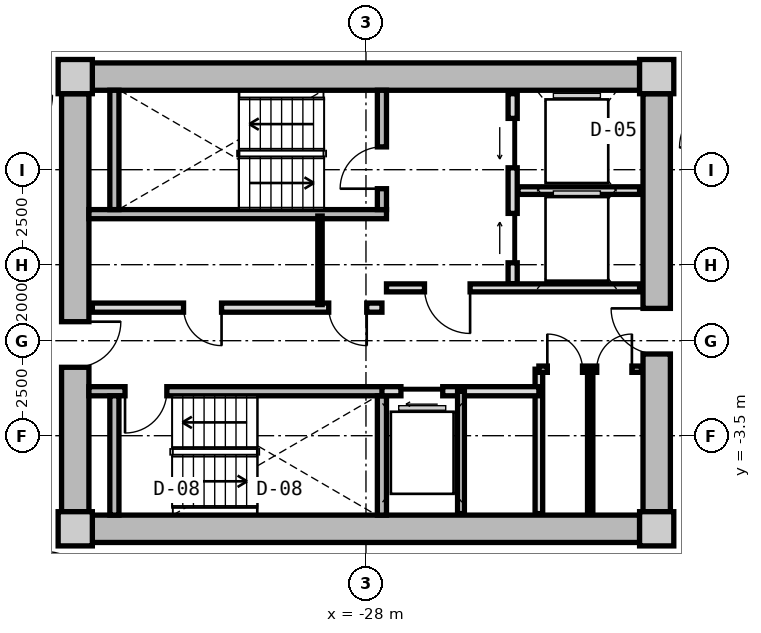
"""IFC4 building model, lengths in metres.
Left out: names, types, materials, properties, quantities, classifications, styles, units other than length and angle.
Written with IfcOpenShell. Run it as: python <this file> out.ifc"""

import sys

from ifc_helpers import new_model, si_unit, direction, frame, frame_2d, origin, origin_2d, place, context, subcontext, project, spatial, rectangle, extrude, source, transform, mapped, element, fill, save


model = new_model("IFC4")
c1 = context("Model", 3, precision=1e-05, world=origin(), true_north=direction((0.0, 1.0)))
c2 = subcontext(c1, "Body", "Model", "MODEL_VIEW")
j1 = project(units=[si_unit("LENGTHUNIT", "METRE"), si_unit("PLANEANGLEUNIT", "RADIAN")], contexts=[c1])
p1 = place(None, origin())
s1 = spatial("IfcSite", under=j1, at=p1, CompositionType="ELEMENT")
p2 = place(p1, origin())
s2 = spatial("IfcBuilding", under=s1, at=p2, CompositionType="ELEMENT")
p3 = place(p2, frame((0.0, 0.0, 108.45)))
s3 = spatial("IfcBuildingStorey", under=s2, at=p3, CompositionType="ELEMENT", Elevation=108.45)
m1 = source(origin(), c2, "Body", "SweptSolid", [
    extrude(rectangle(XDim=0.9, YDim=0.9, at=origin_2d()), origin(), (0.0, 0.0, 1.0), 3.05),
])
for number, where, z_axis, x_axis in (
    (1, (-35.65, -5.95, 0.0), (0.0, 0.0, 1.0), (1.0, 0.0, 0.0)),
    (2, (-20.35, -5.95, 0.0), (0.0, 0.0, 1.0), (1.0, 0.0, 0.0)),
    (3, (-20.35, 5.95, 0.0), (0.0, 0.0, 1.0), (1.0, 0.0, 0.0)),
    (4, (-35.65, 5.95, 0.0), (0.0, 0.0, 1.0), (1.0, 0.0, 0.0)),
):
    element("IfcColumn", number, at=place(p3, frame(where, z_axis=z_axis, x_axis=x_axis)), inside=s3, PredefinedType="COLUMN", context=c2, shape_type="MappedRepresentation", body=[
        mapped(m1, transform((0.0, 0.0, 0.0), x_axis=(1.0, 0.0, 0.0), y_axis=(0.0, 1.0, 0.0), z_axis=(0.0, 0.0, 1.0), scale=1.0)),
    ])
m2 = source(origin(), c2, "Body", "SweptSolid", [
    extrude(rectangle(XDim=14.4, YDim=0.72, at=frame_2d((7.2, 0.0))), origin(), (0.0, 0.0, 1.0), 2.79),
])
for number, where, z_axis, x_axis in (
    (5, (-35.2, 5.95, 0.0), (0.0, 0.0, 1.0), (1.0, 0.0, 0.0)),
    (6, (-20.8, -5.95, 0.0), (0.0, 0.0, 1.0), (-1.0, 0.0, 0.0)),
):
    element("IfcWall", number, at=place(p3, frame(where, z_axis=z_axis, x_axis=x_axis)), inside=s3, PredefinedType="SHEAR", context=c2, shape_type="MappedRepresentation", body=[
        mapped(m2, transform((0.0, 0.0, 0.0), x_axis=(1.0, 0.0, 0.0), y_axis=(0.0, 1.0, 0.0), z_axis=(0.0, 0.0, 1.0), scale=1.0)),
    ])
m3 = source(origin(), c2, "Body", "SweptSolid", [
    extrude(rectangle(XDim=11.0, YDim=0.72, at=frame_2d((5.5, 0.0))), origin(), (0.0, 0.0, 1.0), 2.79),
])
p4 = place(p3, frame((-35.65, -5.5, 0.0), z_axis=(0.0, 0.0, 1.0), x_axis=(0.0, 1.0, 0.0)))
e7 = element("IfcWall", 7, at=p4, inside=s3, PredefinedType="SHEAR", context=c2, shape_type="MappedRepresentation", body=[
    mapped(m3, transform((0.0, 0.0, 0.0), x_axis=(1.0, 0.0, 0.0), y_axis=(0.0, 1.0, 0.0), z_axis=(0.0, 0.0, 1.0), scale=1.0)),
])
p5 = place(p4, frame((3.8, 0.0, 0.0)))
e8 = element("IfcOpeningElement", 8, at=p5, cuts=e7, PredefinedType="OPENING", context=c2, shape_type="SweptSolid", body=[
    extrude(rectangle(XDim=1.2, YDim=2.15, at=frame_2d((0.6, 1.075))), frame((0.0, 0.37, 0.0), z_axis=(0.0, -1.0, 0.0), x_axis=(1.0, 0.0, 0.0)), (0.0, 0.0, 1.0), 0.74),
])
p6 = place(p3, frame((-20.35, 5.5, 0.0), z_axis=(0.0, 0.0, 1.0), x_axis=(0.0, -1.0, 0.0)))
e9 = element("IfcWall", 9, at=p6, inside=s3, PredefinedType="SHEAR", context=c2, shape_type="MappedRepresentation", body=[
    mapped(m3, transform((0.0, 0.0, 0.0), x_axis=(1.0, 0.0, 0.0), y_axis=(0.0, 1.0, 0.0), z_axis=(0.0, 0.0, 1.0), scale=1.0)),
])
p7 = place(p6, frame((5.65, 0.0, 0.0)))
e10 = element("IfcOpeningElement", 10, at=p7, cuts=e9, PredefinedType="OPENING", context=c2, shape_type="SweptSolid", body=[
    extrude(rectangle(XDim=1.2, YDim=2.15, at=frame_2d((0.6, 1.075))), frame((0.0, 0.37, 0.0), z_axis=(0.0, -1.0, 0.0), x_axis=(1.0, 0.0, 0.0)), (0.0, 0.0, 1.0), 0.74),
])
m4 = source(origin(), c2, "Body", "SweptSolid", [
    extrude(rectangle(XDim=7.83, YDim=0.24, at=frame_2d((3.915, 0.0))), origin(), (0.0, 0.0, 1.0), 2.79),
])
p8 = place(p3, frame((-35.29, 2.33, 0.0), z_axis=(0.0, 0.0, 1.0), x_axis=(1.0, 0.0, 0.0)))
e11 = element("IfcWall", 11, at=p8, inside=s3, PredefinedType="PARTITIONING", context=c2, shape_type="MappedRepresentation", body=[
    mapped(m4, transform((0.0, 0.0, 0.0), x_axis=(1.0, 0.0, 0.0), y_axis=(0.0, 1.0, 0.0), z_axis=(0.0, 0.0, 1.0), scale=1.0)),
])
m5 = source(origin(), c2, "Body", "SweptSolid", [
    extrude(rectangle(XDim=3.14, YDim=0.24, at=frame_2d((1.57, 0.0))), origin(), (0.0, 0.0, 1.0), 2.79),
])
p9 = place(p3, frame((-34.62, 2.45, 0.0), z_axis=(0.0, 0.0, 1.0), x_axis=(0.0, 1.0, 0.0)))
e12 = element("IfcWall", 12, at=p9, inside=s3, PredefinedType="PARTITIONING", context=c2, shape_type="MappedRepresentation", body=[
    mapped(m5, transform((0.0, 0.0, 0.0), x_axis=(1.0, 0.0, 0.0), y_axis=(0.0, 1.0, 0.0), z_axis=(0.0, 0.0, 1.0), scale=1.0)),
])
p10 = place(p3, frame((-27.58, 2.45, 0.0), z_axis=(0.0, 0.0, 1.0), x_axis=(0.0, 1.0, 0.0)))
e13 = element("IfcWall", 13, at=p10, inside=s3, PredefinedType="PARTITIONING", context=c2, shape_type="MappedRepresentation", body=[
    mapped(m5, transform((0.0, 0.0, 0.0), x_axis=(1.0, 0.0, 0.0), y_axis=(0.0, 1.0, 0.0), z_axis=(0.0, 0.0, 1.0), scale=1.0)),
])
p11 = place(p10, frame((0.55, 0.0, 0.0)))
e14 = element("IfcOpeningElement", 14, at=p11, cuts=e13, PredefinedType="OPENING", context=c2, shape_type="SweptSolid", body=[
    extrude(rectangle(XDim=1.1, YDim=2.15, at=frame_2d((0.55, 1.075))), frame((0.0, 0.13, 0.0), z_axis=(0.0, -1.0, 0.0), x_axis=(1.0, 0.0, 0.0)), (0.0, 0.0, 1.0), 0.26),
])
p12 = place(p3, frame((-35.29, -2.33, 0.0), z_axis=(0.0, 0.0, 1.0), x_axis=(1.0, 0.0, 0.0)))
e15 = element("IfcWall", 15, at=p12, inside=s3, PredefinedType="PARTITIONING", context=c2, shape_type="MappedRepresentation", body=[
    mapped(m4, transform((0.0, 0.0, 0.0), x_axis=(1.0, 0.0, 0.0), y_axis=(0.0, 1.0, 0.0), z_axis=(0.0, 0.0, 1.0), scale=1.0)),
])
p13 = place(p12, frame((0.95, 0.0, 0.0)))
e16 = element("IfcOpeningElement", 16, at=p13, cuts=e15, PredefinedType="OPENING", context=c2, shape_type="SweptSolid", body=[
    extrude(rectangle(XDim=1.1, YDim=2.15, at=frame_2d((0.55, 1.075))), frame((0.0, 0.13, 0.0), z_axis=(0.0, -1.0, 0.0), x_axis=(1.0, 0.0, 0.0)), (0.0, 0.0, 1.0), 0.26),
])
for number, where, z_axis, x_axis in (
    (17, (-34.62, -5.59, 0.0), (0.0, 0.0, 1.0), (0.0, 1.0, 0.0)),
    (18, (-27.58, -5.59, 0.0), (0.0, 0.0, 1.0), (0.0, 1.0, 0.0)),
):
    element("IfcWall", number, at=place(p3, frame(where, z_axis=z_axis, x_axis=x_axis)), inside=s3, PredefinedType="PARTITIONING", context=c2, shape_type="MappedRepresentation", body=[
        mapped(m5, transform((0.0, 0.0, 0.0), x_axis=(1.0, 0.0, 0.0), y_axis=(0.0, 1.0, 0.0), z_axis=(0.0, 0.0, 1.0), scale=1.0)),
    ])
m6 = source(origin(), c2, "Body", "SweptSolid", [
    extrude(rectangle(XDim=5.0, YDim=0.24, at=frame_2d((2.5, 0.0))), origin(), (0.0, 0.0, 1.0), 2.775),
])
p14 = place(p3, frame((-24.14, 0.5, 0.0), z_axis=(0.0, 0.0, 1.0), x_axis=(0.0, 1.0, 0.0)))
e19 = element("IfcWall", 19, at=p14, inside=s3, PredefinedType="PARTITIONING", context=c2, shape_type="MappedRepresentation", body=[
    mapped(m6, transform((0.0, 0.0, 0.0), x_axis=(1.0, 0.0, 0.0), y_axis=(0.0, 1.0, 0.0), z_axis=(0.0, 0.0, 1.0), scale=1.0)),
])
p15 = place(p14, frame((3.05, 0.0, 0.0)))
e20 = element("IfcOpeningElement", 20, at=p15, cuts=e19, PredefinedType="OPENING", context=c2, shape_type="SweptSolid", body=[
    extrude(rectangle(XDim=1.3, YDim=2.2, at=frame_2d((0.65, 1.1))), frame((0.0, 0.13, 0.0), z_axis=(0.0, -1.0, 0.0), x_axis=(1.0, 0.0, 0.0)), (0.0, 0.0, 1.0), 0.26),
])
p16 = place(p14, frame((0.55, 0.0, 0.0)))
e21 = element("IfcOpeningElement", 21, at=p16, cuts=e19, PredefinedType="OPENING", context=c2, shape_type="SweptSolid", body=[
    extrude(rectangle(XDim=1.3, YDim=2.2, at=frame_2d((0.65, 1.1))), frame((0.0, 0.13, 0.0), z_axis=(0.0, -1.0, 0.0), x_axis=(1.0, 0.0, 0.0)), (0.0, 0.0, 1.0), 0.26),
])
m7 = source(origin(), c2, "Body", "SweptSolid", [
    extrude(rectangle(XDim=3.2, YDim=0.2, at=frame_2d((1.6, 0.0))), origin(), (0.0, 0.0, 1.0), 2.775),
])
p17 = place(p3, frame((-24.0, 2.95, 0.0), z_axis=(0.0, 0.0, 1.0), x_axis=(1.0, 0.0, 0.0)))
e22 = element("IfcWall", 22, at=p17, inside=s3, PredefinedType="PARTITIONING", context=c2, shape_type="MappedRepresentation", body=[
    mapped(m7, transform((0.0, 0.0, 0.0), x_axis=(1.0, 0.0, 0.0), y_axis=(0.0, 1.0, 0.0), z_axis=(0.0, 0.0, 1.0), scale=1.0)),
])
m8 = source(origin(), c2, "Body", "SweptSolid", [
    extrude(rectangle(XDim=6.66, YDim=0.21, at=frame_2d((3.33, 0.0))), origin(), (0.0, 0.0, 1.0), 2.775),
])
p18 = place(p3, frame((-27.46, 0.39, 0.0), z_axis=(0.0, 0.0, 1.0), x_axis=(1.0, 0.0, 0.0)))
e23 = element("IfcWall", 23, at=p18, inside=s3, PredefinedType="PARTITIONING", context=c2, shape_type="MappedRepresentation", body=[
    mapped(m8, transform((0.0, 0.0, 0.0), x_axis=(1.0, 0.0, 0.0), y_axis=(0.0, 1.0, 0.0), z_axis=(0.0, 0.0, 1.0), scale=1.0)),
])
p19 = place(p18, frame((1.0, 0.0, 0.0)))
e24 = element("IfcOpeningElement", 24, at=p19, cuts=e23, PredefinedType="OPENING", context=c2, shape_type="SweptSolid", body=[
    extrude(rectangle(XDim=1.2, YDim=2.15, at=frame_2d((0.6, 1.075))), frame((0.0, 0.115, 0.0), z_axis=(0.0, -1.0, 0.0), x_axis=(1.0, 0.0, 0.0)), (0.0, 0.0, 1.0), 0.23),
])
m9 = source(origin(), c2, "Body", "SweptSolid", [
    extrude(rectangle(XDim=7.62, YDim=0.24, at=frame_2d((3.81, 0.0))), origin(), (0.0, 0.0, 1.0), 2.775),
])
p20 = place(p3, frame((-35.2, -0.13, 0.0), z_axis=(0.0, 0.0, 1.0), x_axis=(1.0, 0.0, 0.0)))
e25 = element("IfcWall", 25, at=p20, inside=s3, PredefinedType="PARTITIONING", context=c2, shape_type="MappedRepresentation", body=[
    mapped(m9, transform((0.0, 0.0, 0.0), x_axis=(1.0, 0.0, 0.0), y_axis=(0.0, 1.0, 0.0), z_axis=(0.0, 0.0, 1.0), scale=1.0)),
])
p21 = place(p20, frame((6.22, 0.0, 0.0)))
e26 = element("IfcOpeningElement", 26, at=p21, cuts=e25, PredefinedType="OPENING", context=c2, shape_type="SweptSolid", body=[
    extrude(rectangle(XDim=1.0, YDim=2.1, at=frame_2d((0.5, 1.05))), frame((0.0, 0.13, 0.0), z_axis=(0.0, -1.0, 0.0), x_axis=(1.0, 0.0, 0.0)), (0.0, 0.0, 1.0), 0.26),
])
p22 = place(p20, frame((2.4, 0.0, 0.0)))
e27 = element("IfcOpeningElement", 27, at=p22, cuts=e25, PredefinedType="OPENING", context=c2, shape_type="SweptSolid", body=[
    extrude(rectangle(XDim=1.0, YDim=2.1, at=frame_2d((0.5, 1.05))), frame((0.0, 0.13, 0.0), z_axis=(0.0, -1.0, 0.0), x_axis=(1.0, 0.0, 0.0)), (0.0, 0.0, 1.0), 0.26),
])
m10 = source(origin(), c2, "Body", "SweptSolid", [
    extrude(rectangle(XDim=2.33, YDim=0.115, at=frame_2d((1.165, 0.0))), origin(), (0.0, 0.0, 1.0), 2.775),
])
p23 = place(p3, frame((-29.21, -0.05, 0.0), z_axis=(0.0, 0.0, 1.0), x_axis=(0.0, 1.0, 0.0)))
e28 = element("IfcWall", 28, at=p23, inside=s3, PredefinedType="PARTITIONING", context=c2, shape_type="MappedRepresentation", body=[
    mapped(m10, transform((0.0, 0.0, 0.0), x_axis=(1.0, 0.0, 0.0), y_axis=(0.0, 1.0, 0.0), z_axis=(0.0, 0.0, 1.0), scale=1.0)),
])
m11 = source(origin(), c2, "Body", "SweptSolid", [
    extrude(rectangle(XDim=3.8, YDim=0.2, at=frame_2d((1.9, 0.0))), origin(), (0.0, 0.0, 1.0), 2.775),
])
p24 = place(p3, frame((-23.45, -5.55, 0.0), z_axis=(0.0, 0.0, 1.0), x_axis=(0.0, 1.0, 0.0)))
e29 = element("IfcWall", 29, at=p24, inside=s3, PredefinedType="PARTITIONING", context=c2, shape_type="MappedRepresentation", body=[
    mapped(m11, transform((0.0, 0.0, 0.0), x_axis=(1.0, 0.0, 0.0), y_axis=(0.0, 1.0, 0.0), z_axis=(0.0, 0.0, 1.0), scale=1.0)),
])
m12 = source(origin(), c2, "Body", "SweptSolid", [
    extrude(rectangle(XDim=4.13, YDim=0.24, at=frame_2d((2.065, 0.0))), origin(), (0.0, 0.0, 1.0), 2.775),
])
p25 = place(p3, frame((-27.58, -2.33, 0.0), z_axis=(0.0, 0.0, 1.0), x_axis=(1.0, 0.0, 0.0)))
e30 = element("IfcWall", 30, at=p25, inside=s3, PredefinedType="PARTITIONING", context=c2, shape_type="MappedRepresentation", body=[
    mapped(m12, transform((0.0, 0.0, 0.0), x_axis=(1.0, 0.0, 0.0), y_axis=(0.0, 1.0, 0.0), z_axis=(0.0, 0.0, 1.0), scale=1.0)),
])
p26 = place(p25, frame((0.5, 0.0, 0.0)))
e31 = element("IfcOpeningElement", 31, at=p26, cuts=e30, PredefinedType="OPENING", context=c2, shape_type="SweptSolid", body=[
    extrude(rectangle(XDim=1.1, YDim=2.2, at=frame_2d((0.55, 1.1))), frame((0.0, 0.13, 0.0), z_axis=(0.0, -1.0, 0.0), x_axis=(1.0, 0.0, 0.0)), (0.0, 0.0, 1.0), 0.26),
])
m13 = source(origin(), c2, "Body", "SweptSolid", [
    extrude(rectangle(XDim=3.22, YDim=0.18, at=frame_2d((1.61, 0.0))), origin(), (0.0, 0.0, 1.0), 2.775),
])
p27 = place(p3, frame((-25.5, -5.55, 0.0), z_axis=(0.0, 0.0, 1.0), x_axis=(0.0, 1.0, 0.0)))
e32 = element("IfcWall", 32, at=p27, inside=s3, PredefinedType="PARTITIONING", context=c2, shape_type="MappedRepresentation", body=[
    mapped(m13, transform((0.0, 0.0, 0.0), x_axis=(1.0, 0.0, 0.0), y_axis=(0.0, 1.0, 0.0), z_axis=(0.0, 0.0, 1.0), scale=1.0)),
])
m14 = source(origin(), c2, "Body", "SweptSolid", [
    extrude(rectangle(XDim=2.7, YDim=0.165, at=frame_2d((1.35, 0.0))), origin(), (0.0, 0.0, 1.0), 2.775),
])
p28 = place(p3, frame((-23.45, -1.75, 0.0), z_axis=(0.0, 0.0, 1.0), x_axis=(1.0, 0.0, 0.0)))
e33 = element("IfcWall", 33, at=p28, inside=s3, PredefinedType="PARTITIONING", context=c2, shape_type="MappedRepresentation", body=[
    mapped(m14, transform((0.0, 0.0, 0.0), x_axis=(1.0, 0.0, 0.0), y_axis=(0.0, 1.0, 0.0), z_axis=(0.0, 0.0, 1.0), scale=1.0)),
])
p29 = place(p28, frame((0.222, 0.0, 0.0)))
e34 = element("IfcOpeningElement", 34, at=p29, cuts=e33, PredefinedType="OPENING", context=c2, shape_type="SweptSolid", body=[
    extrude(rectangle(XDim=0.925, YDim=2.1, at=frame_2d((0.462, 1.05))), frame((0.0, 0.093, 0.0), z_axis=(0.0, -1.0, 0.0), x_axis=(1.0, 0.0, 0.0)), (0.0, 0.0, 1.0), 0.185),
])
p30 = place(p28, frame((1.522, 0.0, 0.0)))
e35 = element("IfcOpeningElement", 35, at=p30, cuts=e33, PredefinedType="OPENING", context=c2, shape_type="SweptSolid", body=[
    extrude(rectangle(XDim=0.925, YDim=2.1, at=frame_2d((0.462, 1.05))), frame((0.0, 0.093, 0.0), z_axis=(0.0, -1.0, 0.0), x_axis=(1.0, 0.0, 0.0)), (0.0, 0.0, 1.0), 0.185),
])
m15 = source(origin(), c2, "Body", "SweptSolid", [
    extrude(rectangle(XDim=3.8, YDim=0.14, at=frame_2d((1.9, 0.0))), origin(), (0.0, 0.0, 1.0), 2.775),
])
p31 = place(p3, frame((-22.1, -5.55, 0.0), z_axis=(0.0, 0.0, 1.0), x_axis=(0.0, 1.0, 0.0)))
e36 = element("IfcWall", 36, at=p31, inside=s3, PredefinedType="PARTITIONING", context=c2, shape_type="MappedRepresentation", body=[
    mapped(m15, transform((0.0, 0.0, 0.0), x_axis=(1.0, 0.0, 0.0), y_axis=(0.0, 1.0, 0.0), z_axis=(0.0, 0.0, 1.0), scale=1.0)),
])
m16 = source(origin(), c2, "Body", "SweptSolid", [
    extrude(rectangle(XDim=1.1, YDim=2.15, at=frame_2d((0.55, 1.075))), frame((0.0, 0.025, 0.0), z_axis=(0.0, -1.0, 0.0), x_axis=(1.0, 0.0, 0.0)), (0.0, 0.0, 1.0), 0.05),
])
p32 = place(p11, origin())
e37 = element("IfcDoor", 37, at=p32, inside=s3, OperationType="SINGLE_SWING_LEFT", PredefinedType="DOOR", context=c2, shape_type="MappedRepresentation", body=[
    mapped(m16, transform((0.0, 0.0, 0.0), x_axis=(1.0, 0.0, 0.0), y_axis=(0.0, 1.0, 0.0), z_axis=(0.0, 0.0, 1.0), scale=1.0)),
])
fill(e14, e37)
p33 = place(p13, frame((1.1, 0.0, 0.0), z_axis=(0.0, 0.0, 1.0), x_axis=(-1.0, 0.0, 0.0)))
e38 = element("IfcDoor", 38, at=p33, inside=s3, OperationType="SINGLE_SWING_RIGHT", PredefinedType="DOOR", context=c2, shape_type="MappedRepresentation", body=[
    mapped(m16, transform((0.0, 0.0, 0.0), x_axis=(1.0, 0.0, 0.0), y_axis=(0.0, 1.0, 0.0), z_axis=(0.0, 0.0, 1.0), scale=1.0)),
])
fill(e16, e38)
m17 = source(origin(), c2, "Body", "SweptSolid", [
    extrude(rectangle(XDim=1.3, YDim=2.2, at=frame_2d((0.65, 1.1))), frame((0.0, 0.025, 0.0), z_axis=(0.0, -1.0, 0.0), x_axis=(1.0, 0.0, 0.0)), (0.0, 0.0, 1.0), 0.05),
])
p34 = place(p15, origin())
e39 = element("IfcDoor", 39, at=p34, inside=s3, OperationType="SLIDING_TO_LEFT", PredefinedType="DOOR", context=c2, shape_type="MappedRepresentation", body=[
    mapped(m17, transform((0.0, 0.0, 0.0), x_axis=(1.0, 0.0, 0.0), y_axis=(0.0, 1.0, 0.0), z_axis=(0.0, 0.0, 1.0), scale=1.0)),
])
fill(e20, e39)
p35 = place(p16, origin())
e40 = element("IfcDoor", 40, at=p35, inside=s3, OperationType="SLIDING_TO_RIGHT", PredefinedType="DOOR", context=c2, shape_type="MappedRepresentation", body=[
    mapped(m17, transform((0.0, 0.0, 0.0), x_axis=(1.0, 0.0, 0.0), y_axis=(0.0, 1.0, 0.0), z_axis=(0.0, 0.0, 1.0), scale=1.0)),
])
fill(e21, e40)
m18 = source(origin(), c2, "Body", "SweptSolid", [
    extrude(rectangle(XDim=1.2, YDim=2.15, at=frame_2d((0.6, 1.075))), frame((0.0, 0.025, 0.0), z_axis=(0.0, -1.0, 0.0), x_axis=(1.0, 0.0, 0.0)), (0.0, 0.0, 1.0), 0.05),
])
p36 = place(p19, frame((1.2, 0.0, 0.0), z_axis=(0.0, 0.0, 1.0), x_axis=(-1.0, 0.0, 0.0)))
e41 = element("IfcDoor", 41, at=p36, inside=s3, OperationType="SINGLE_SWING_LEFT", PredefinedType="DOOR", context=c2, shape_type="MappedRepresentation", body=[
    mapped(m18, transform((0.0, 0.0, 0.0), x_axis=(1.0, 0.0, 0.0), y_axis=(0.0, 1.0, 0.0), z_axis=(0.0, 0.0, 1.0), scale=1.0)),
])
fill(e24, e41)
p37 = place(p5, frame((1.2, 0.0, 0.0), z_axis=(0.0, 0.0, 1.0), x_axis=(-1.0, 0.0, 0.0)))
e42 = element("IfcDoor", 42, at=p37, inside=s3, OperationType="SINGLE_SWING_LEFT", PredefinedType="DOOR", context=c2, shape_type="MappedRepresentation", body=[
    mapped(m18, transform((0.0, 0.0, 0.0), x_axis=(1.0, 0.0, 0.0), y_axis=(0.0, 1.0, 0.0), z_axis=(0.0, 0.0, 1.0), scale=1.0)),
])
fill(e8, e42)
p38 = place(p7, frame((1.2, 0.0, 0.0), z_axis=(0.0, 0.0, 1.0), x_axis=(-1.0, 0.0, 0.0)))
e43 = element("IfcDoor", 43, at=p38, inside=s3, OperationType="SINGLE_SWING_RIGHT", PredefinedType="DOOR", context=c2, shape_type="MappedRepresentation", body=[
    mapped(m18, transform((0.0, 0.0, 0.0), x_axis=(1.0, 0.0, 0.0), y_axis=(0.0, 1.0, 0.0), z_axis=(0.0, 0.0, 1.0), scale=1.0)),
])
fill(e10, e43)
m19 = source(origin(), c2, "Body", "SweptSolid", [
    extrude(rectangle(XDim=1.0, YDim=2.1, at=frame_2d((0.5, 1.05))), frame((0.0, 0.025, 0.0), z_axis=(0.0, -1.0, 0.0), x_axis=(1.0, 0.0, 0.0)), (0.0, 0.0, 1.0), 0.05),
])
p39 = place(p21, frame((1.0, 0.0, 0.0), z_axis=(0.0, 0.0, 1.0), x_axis=(-1.0, 0.0, 0.0)))
e44 = element("IfcDoor", 44, at=p39, inside=s3, OperationType="SINGLE_SWING_LEFT", PredefinedType="DOOR", context=c2, shape_type="MappedRepresentation", body=[
    mapped(m19, transform((0.0, 0.0, 0.0), x_axis=(1.0, 0.0, 0.0), y_axis=(0.0, 1.0, 0.0), z_axis=(0.0, 0.0, 1.0), scale=1.0)),
])
fill(e26, e44)
p40 = place(p22, frame((1.0, 0.0, 0.0), z_axis=(0.0, 0.0, 1.0), x_axis=(-1.0, 0.0, 0.0)))
e45 = element("IfcDoor", 45, at=p40, inside=s3, OperationType="SINGLE_SWING_LEFT", PredefinedType="DOOR", context=c2, shape_type="MappedRepresentation", body=[
    mapped(m19, transform((0.0, 0.0, 0.0), x_axis=(1.0, 0.0, 0.0), y_axis=(0.0, 1.0, 0.0), z_axis=(0.0, 0.0, 1.0), scale=1.0)),
])
fill(e27, e45)
m20 = source(origin(), c2, "Body", "SweptSolid", [
    extrude(rectangle(XDim=1.1, YDim=2.2, at=frame_2d((0.55, 1.1))), frame((0.0, 0.025, 0.0), z_axis=(0.0, -1.0, 0.0), x_axis=(1.0, 0.0, 0.0)), (0.0, 0.0, 1.0), 0.05),
])
p41 = place(p26, frame((1.1, 0.0, 0.0), z_axis=(0.0, 0.0, 1.0), x_axis=(-1.0, 0.0, 0.0)))
e46 = element("IfcDoor", 46, at=p41, inside=s3, OperationType="SLIDING_TO_LEFT", PredefinedType="DOOR", context=c2, shape_type="MappedRepresentation", body=[
    mapped(m20, transform((0.0, 0.0, 0.0), x_axis=(1.0, 0.0, 0.0), y_axis=(0.0, 1.0, 0.0), z_axis=(0.0, 0.0, 1.0), scale=1.0)),
])
fill(e31, e46)
m21 = source(origin(), c2, "Body", "SweptSolid", [
    extrude(rectangle(XDim=0.925, YDim=2.1, at=frame_2d((0.462, 1.05))), frame((0.0, 0.025, 0.0), z_axis=(0.0, -1.0, 0.0), x_axis=(1.0, 0.0, 0.0)), (0.0, 0.0, 1.0), 0.05),
])
p42 = place(p29, origin())
e47 = element("IfcDoor", 47, at=p42, inside=s3, OperationType="SINGLE_SWING_LEFT", PredefinedType="DOOR", context=c2, shape_type="MappedRepresentation", body=[
    mapped(m21, transform((0.0, 0.0, 0.0), x_axis=(1.0, 0.0, 0.0), y_axis=(0.0, 1.0, 0.0), z_axis=(0.0, 0.0, 1.0), scale=1.0)),
])
fill(e34, e47)
p43 = place(p30, origin())
e48 = element("IfcDoor", 48, at=p43, inside=s3, OperationType="SINGLE_SWING_RIGHT", PredefinedType="DOOR", context=c2, shape_type="MappedRepresentation", body=[
    mapped(m21, transform((0.0, 0.0, 0.0), x_axis=(1.0, 0.0, 0.0), y_axis=(0.0, 1.0, 0.0), z_axis=(0.0, 0.0, 1.0), scale=1.0)),
])
fill(e35, e48)
save(model, sys.argv[1])
